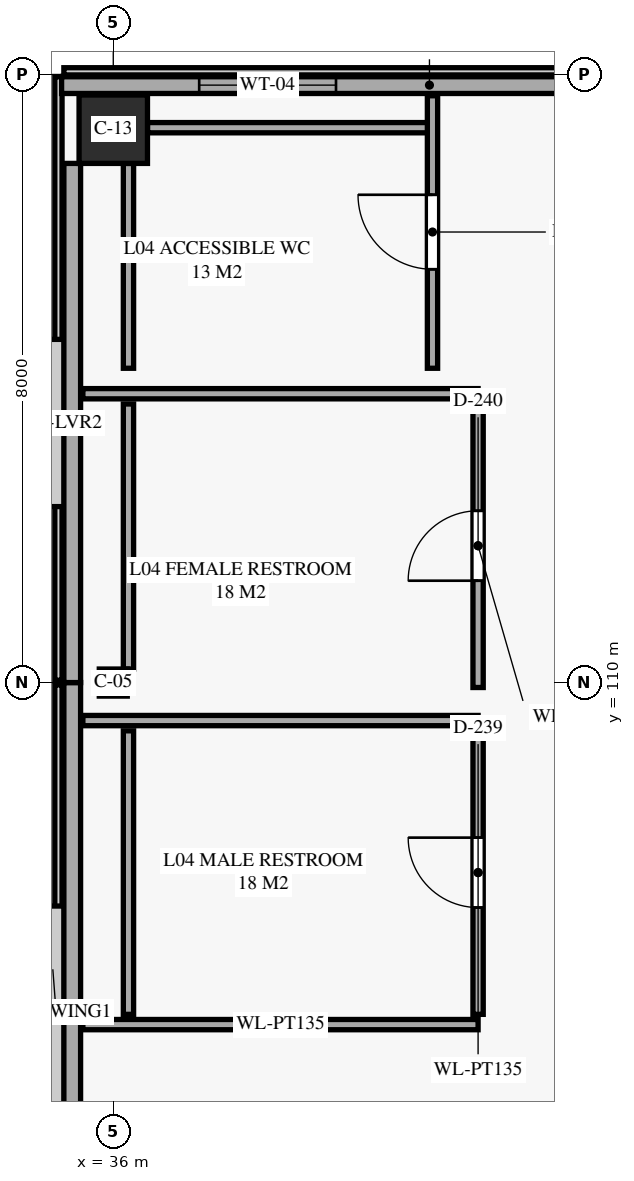
"""IFC4 building model, lengths in metres.
Left out: names, types, materials, properties, quantities, classifications, styles, units other than length and angle.
Written with IfcOpenShell. Run it as: python <this file> out.ifc"""

import sys

from ifc_helpers import new_model, si_unit, direction, frame, frame_2d, origin, origin_2d, place, context, subcontext, project, spatial, rectangle, i_section, extrude, element, fill, save


model = new_model("IFC4")
c1 = context("Model", 3, precision=1e-05, world=origin(), true_north=direction((0.0, 1.0)))
c2 = subcontext(c1, "Body", "Model", "MODEL_VIEW")
j1 = project(units=[si_unit("LENGTHUNIT", "METRE"), si_unit("PLANEANGLEUNIT", "RADIAN")], contexts=[c1])
p1 = place(None, origin())
s1 = spatial("IfcSite", under=j1, at=p1, CompositionType="ELEMENT")
p2 = place(p1, origin())
s2 = spatial("IfcBuilding", under=s1, at=p2, CompositionType="ELEMENT")
p3 = place(p2, frame((0.0, 0.0, 20.0)))
s3 = spatial("IfcBuildingStorey", under=s2, at=p3, CompositionType="ELEMENT", Elevation=20.0)
p4 = place(p3, frame((36.0, 110.0, 0.0), z_axis=(0.0, 0.0, 1.0), x_axis=(1.0, 0.0, 0.0)))
e1 = element("IfcColumn", 1, at=p4, inside=s3, PredefinedType="COLUMN", context=c2, shape_type="SweptSolid", body=[
    extrude(i_section(OverallWidth=0.368, OverallDepth=0.356, WebThickness=0.011, FlangeThickness=0.018, FilletRadius=0.015, at=origin_2d()), origin(), (0.0, 0.0, 1.0), 4.8),
])
p5 = place(p3, frame((36.0, 117.28, 0.0), z_axis=(0.0, 0.0, 1.0), x_axis=(1.0, 0.0, 0.0)))
e2 = element("IfcColumn", 2, at=p5, inside=s3, PredefinedType="COLUMN", context=c2, shape_type="SweptSolid", body=[
    extrude(rectangle(XDim=0.9, YDim=0.9, at=origin_2d()), origin(), (0.0, 0.0, 1.0), 4.8),
])
p6 = place(p3, frame((35.46, 101.32, 0.0), z_axis=(0.0, 0.0, 1.0), x_axis=(0.0, 1.0, 0.0)))
e3 = element("IfcWall", 3, at=p6, inside=s3, PredefinedType="SOLIDWALL", context=c2, shape_type="SweptSolid", body=[
    extrude(rectangle(XDim=8.68, YDim=0.22, at=frame_2d((4.34, 0.0))), origin(), (0.0, 0.0, 1.0), 4.54),
])
p7 = place(p3, frame((35.46, 110.0, 0.0), z_axis=(0.0, 0.0, 1.0), x_axis=(0.0, 1.0, 0.0)))
e4 = element("IfcWall", 4, at=p7, inside=s3, PredefinedType="SOLIDWALL", context=c2, shape_type="SweptSolid", body=[
    extrude(rectangle(XDim=6.83, YDim=0.22, at=frame_2d((3.415, 0.0))), origin(), (0.0, 0.0, 1.0), 4.54),
])
p8 = place(p3, frame((35.32, 117.86, 0.0), z_axis=(0.0, 0.0, 1.0), x_axis=(1.0, 0.0, 0.0)))
e5 = element("IfcWall", 5, at=p8, inside=s3, PredefinedType="SOLIDWALL", context=c2, shape_type="SweptSolid", body=[
    extrude(rectangle(XDim=9.68, YDim=0.22, at=frame_2d((4.84, 0.0))), origin(), (0.0, 0.0, 1.0), 4.54),
])
p9 = place(p8, frame((1.81, 0.0, 0.65)))
e6 = element("IfcOpeningElement", 6, at=p9, cuts=e5, PredefinedType="OPENING", context=c2, shape_type="SweptSolid", body=[
    extrude(rectangle(XDim=1.8, YDim=2.3, at=frame_2d((0.9, 1.15))), frame((0.0, 0.12, 0.0), z_axis=(0.0, -1.0, 0.0), x_axis=(1.0, 0.0, 0.0)), (0.0, 0.0, 1.0), 0.24),
])
p10 = place(p8, frame((6.87, 0.0, 0.65)))
e7 = element("IfcOpeningElement", 7, at=p10, cuts=e5, PredefinedType="OPENING", context=c2, shape_type="SweptSolid", body=[
    extrude(rectangle(XDim=2.2, YDim=2.3, at=frame_2d((1.1, 1.15))), frame((0.0, 0.12, 0.0), z_axis=(0.0, -1.0, 0.0), x_axis=(1.0, 0.0, 0.0)), (0.0, 0.0, 1.0), 0.24),
])
for number, where, z_axis, x_axis in (
    (8, (35.6, 105.5, 0.0), (0.0, 0.0, 1.0), (1.0, 0.0, 0.0)),
    (9, (40.8, 109.5, 0.0), (0.0, 0.0, 1.0), (-1.0, 0.0, 0.0)),
):
    element("IfcWall", number, at=place(p3, frame(where, z_axis=z_axis, x_axis=x_axis)), inside=s3, PredefinedType="PARTITIONING", context=c2, shape_type="SweptSolid", body=[
        extrude(rectangle(XDim=5.2, YDim=0.135, at=frame_2d((2.6, 0.0))), origin(), (0.0, 0.0, 1.0), 4.54),
    ])
p11 = place(p3, frame((36.2, 109.365, 0.0), z_axis=(0.0, 0.0, 1.0), x_axis=(0.0, -1.0, 0.0)))
e10 = element("IfcWall", 10, at=p11, inside=s3, PredefinedType="PARTITIONING", context=c2, shape_type="SweptSolid", body=[
    extrude(rectangle(XDim=3.73, YDim=0.135, at=frame_2d((1.865, 0.0))), origin(), (0.0, 0.0, 1.0), 4.063),
])
p12 = place(p3, frame((40.8, 105.635, 0.0), z_axis=(0.0, 0.0, 1.0), x_axis=(0.0, 1.0, 0.0)))
e11 = element("IfcWall", 11, at=p12, inside=s3, PredefinedType="PARTITIONING", context=c2, shape_type="SweptSolid", body=[
    extrude(rectangle(XDim=3.73, YDim=0.135, at=frame_2d((1.865, 0.0))), origin(), (0.0, 0.0, 1.0), 4.54),
])
p13 = place(p12, frame((1.405, 0.0, 0.0)))
e12 = element("IfcOpeningElement", 12, at=p13, cuts=e11, PredefinedType="OPENING", context=c2, shape_type="SweptSolid", body=[
    extrude(rectangle(XDim=0.92, YDim=2.1, at=frame_2d((0.46, 1.05))), frame((0.0, 0.078, 0.0), z_axis=(0.0, -1.0, 0.0), x_axis=(1.0, 0.0, 0.0)), (0.0, 0.0, 1.0), 0.155),
])
p14 = place(p3, frame((40.8, 113.8, 0.0), z_axis=(0.0, 0.0, 1.0), x_axis=(-1.0, 0.0, 0.0)))
e13 = element("IfcWall", 13, at=p14, inside=s3, PredefinedType="PARTITIONING", context=c2, shape_type="SweptSolid", body=[
    extrude(rectangle(XDim=5.2, YDim=0.135, at=frame_2d((2.6, 0.0))), origin(), (0.0, 0.0, 1.0), 4.54),
])
p15 = place(p3, frame((36.2, 113.665, 0.0), z_axis=(0.0, 0.0, 1.0), x_axis=(0.0, -1.0, 0.0)))
e14 = element("IfcWall", 14, at=p15, inside=s3, PredefinedType="PARTITIONING", context=c2, shape_type="SweptSolid", body=[
    extrude(rectangle(XDim=3.487, YDim=0.135, at=frame_2d((1.744, 0.0))), origin(), (0.0, 0.0, 1.0), 3.83),
])
p16 = place(p3, frame((40.8, 109.935, 0.0), z_axis=(0.0, 0.0, 1.0), x_axis=(0.0, 1.0, 0.0)))
e15 = element("IfcWall", 15, at=p16, inside=s3, PredefinedType="PARTITIONING", context=c2, shape_type="SweptSolid", body=[
    extrude(rectangle(XDim=3.73, YDim=0.135, at=frame_2d((1.865, 0.0))), origin(), (0.0, 0.0, 1.0), 4.54),
])
p17 = place(p16, frame((1.405, 0.0, 0.0)))
e16 = element("IfcOpeningElement", 16, at=p17, cuts=e15, PredefinedType="OPENING", context=c2, shape_type="SweptSolid", body=[
    extrude(rectangle(XDim=0.92, YDim=2.1, at=frame_2d((0.46, 1.05))), frame((0.0, 0.078, 0.0), z_axis=(0.0, -1.0, 0.0), x_axis=(1.0, 0.0, 0.0)), (0.0, 0.0, 1.0), 0.155),
])
p18 = place(p3, frame((40.2, 117.3, 0.0), z_axis=(0.0, 0.0, 1.0), x_axis=(-1.0, 0.0, 0.0)))
e17 = element("IfcWall", 17, at=p18, inside=s3, PredefinedType="PARTITIONING", context=c2, shape_type="SweptSolid", body=[
    extrude(rectangle(XDim=3.75, YDim=0.135, at=frame_2d((1.875, 0.0))), origin(), (0.0, 0.0, 1.0), 3.83),
])
p19 = place(p3, frame((36.2, 116.83, 0.0), z_axis=(0.0, 0.0, 1.0), x_axis=(0.0, -1.0, 0.0)))
e18 = element("IfcWall", 18, at=p19, inside=s3, PredefinedType="PARTITIONING", context=c2, shape_type="SweptSolid", body=[
    extrude(rectangle(XDim=2.695, YDim=0.135, at=frame_2d((1.348, 0.0))), origin(), (0.0, 0.0, 1.0), 3.83),
])
p20 = place(p3, frame((40.2, 114.135, 0.0), z_axis=(0.0, 0.0, 1.0), x_axis=(0.0, 1.0, 0.0)))
e19 = element("IfcWall", 19, at=p20, inside=s3, PredefinedType="PARTITIONING", context=c2, shape_type="SweptSolid", body=[
    extrude(rectangle(XDim=3.585, YDim=0.135, at=frame_2d((1.792, 0.0))), origin(), (0.0, 0.0, 1.0), 4.54),
])
p21 = place(p20, frame((1.302, 0.0, 0.0)))
e20 = element("IfcOpeningElement", 20, at=p21, cuts=e19, PredefinedType="OPENING", context=c2, shape_type="SweptSolid", body=[
    extrude(rectangle(XDim=0.98, YDim=2.1, at=frame_2d((0.49, 1.05))), frame((0.0, 0.078, 0.0), z_axis=(0.0, -1.0, 0.0), x_axis=(1.0, 0.0, 0.0)), (0.0, 0.0, 1.0), 0.155),
])
p22 = place(p9, origin())
e21 = element("IfcWindow", 21, at=p22, inside=s3, PartitioningType="SINGLE_PANEL", PredefinedType="WINDOW", context=c2, shape_type="SweptSolid", body=[
    extrude(rectangle(XDim=1.8, YDim=2.3, at=frame_2d((0.9, 1.15))), frame((0.0, 0.03, 0.0), z_axis=(0.0, -1.0, 0.0), x_axis=(1.0, 0.0, 0.0)), (0.0, 0.0, 1.0), 0.06),
])
fill(e6, e21)
p23 = place(p13, origin())
e22 = element("IfcDoor", 22, at=p23, inside=s3, OperationType="SINGLE_SWING_RIGHT", PredefinedType="DOOR", context=c2, shape_type="SweptSolid", body=[
    extrude(rectangle(XDim=0.92, YDim=2.1, at=frame_2d((0.46, 1.05))), frame((0.0, 0.025, 0.0), z_axis=(0.0, -1.0, 0.0), x_axis=(1.0, 0.0, 0.0)), (0.0, 0.0, 1.0), 0.05),
])
fill(e12, e22)
p24 = place(p17, origin())
e23 = element("IfcDoor", 23, at=p24, inside=s3, OperationType="SINGLE_SWING_LEFT", PredefinedType="DOOR", context=c2, shape_type="SweptSolid", body=[
    extrude(rectangle(XDim=0.92, YDim=2.1, at=frame_2d((0.46, 1.05))), frame((0.0, 0.025, 0.0), z_axis=(0.0, -1.0, 0.0), x_axis=(1.0, 0.0, 0.0)), (0.0, 0.0, 1.0), 0.05),
])
fill(e16, e23)
p25 = place(p21, origin())
e24 = element("IfcDoor", 24, at=p25, inside=s3, OperationType="SINGLE_SWING_RIGHT", PredefinedType="DOOR", context=c2, shape_type="SweptSolid", body=[
    extrude(rectangle(XDim=0.98, YDim=2.1, at=frame_2d((0.49, 1.05))), frame((0.0, 0.025, 0.0), z_axis=(0.0, -1.0, 0.0), x_axis=(1.0, 0.0, 0.0)), (0.0, 0.0, 1.0), 0.05),
])
fill(e20, e24)
save(model, sys.argv[1])
